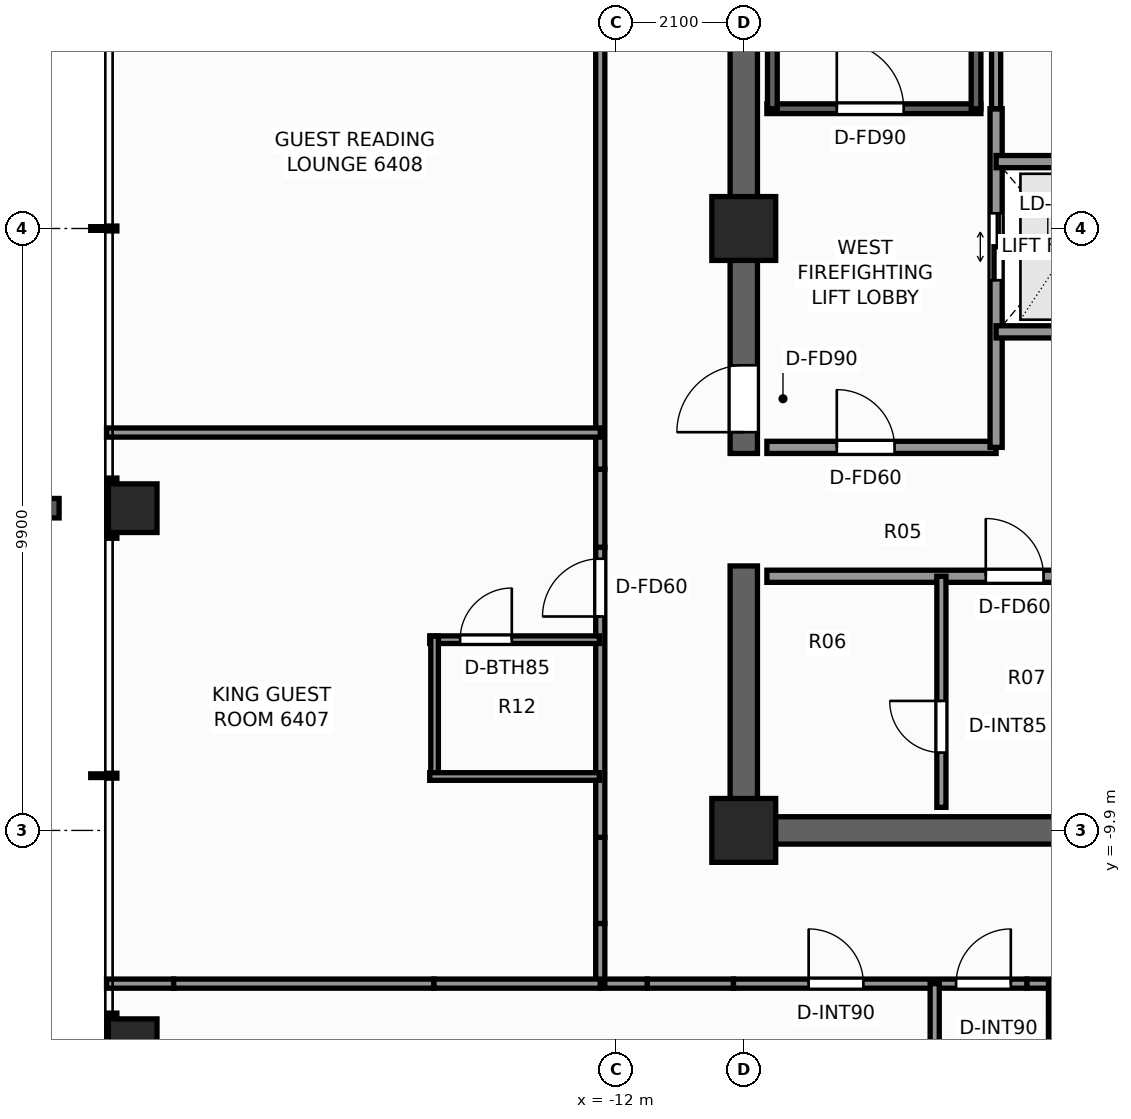
"""IFC4 building model, lengths in metres.
Left out: names, types, materials, properties, quantities, classifications, styles, units other than length and angle.
Written with IfcOpenShell. Run it as: python <this file> out.ifc"""

import sys

from ifc_helpers import new_model, si_unit, direction, frame, frame_2d, origin, origin_2d, place, context, subcontext, project, spatial, rectangle, extrude, element, fill, save


model = new_model("IFC4")
c1 = context("Model", 3, precision=1e-05, world=origin(), true_north=direction((0.0, 1.0)))
c2 = subcontext(c1, "Body", "Model", "MODEL_VIEW")
j1 = project(units=[si_unit("LENGTHUNIT", "METRE"), si_unit("PLANEANGLEUNIT", "RADIAN")], contexts=[c1])
p1 = place(None, origin())
s1 = spatial("IfcSite", under=j1, at=p1, CompositionType="ELEMENT")
p2 = place(p1, origin())
s2 = spatial("IfcBuilding", under=s1, at=p2, CompositionType="ELEMENT")
p3 = place(p2, frame((0.0, 0.0, 219.6)))
s3 = spatial("IfcBuildingStorey", under=s2, at=p3, CompositionType="ELEMENT", Elevation=219.6)
p4 = place(p3, frame((-3.54, -9.9, 0.0), z_axis=(0.0, 0.0, 1.0), x_axis=(-1.0, 0.0, 0.0)))
e1 = element("IfcWall", 1, at=p4, inside=s3, PredefinedType="SHEAR", context=c2, shape_type="SweptSolid", body=[
    extrude(rectangle(XDim=6.585, YDim=0.45, at=frame_2d((3.292, 0.0))), origin(), (0.0, 0.0, 1.0), 3.3),
])
p5 = place(p3, frame((-9.9, -9.675, 0.0), z_axis=(0.0, 0.0, 1.0), x_axis=(0.0, 1.0, 0.0)))
e2 = element("IfcWall", 2, at=p5, inside=s3, PredefinedType="SHEAR", context=c2, shape_type="SweptSolid", body=[
    extrude(rectangle(XDim=4.125, YDim=0.45, at=frame_2d((2.062, 0.0))), origin(), (0.0, 0.0, 1.0), 3.3),
])
p6 = place(p3, frame((-9.9, -3.7, 0.0), z_axis=(0.0, 0.0, 1.0), x_axis=(0.0, 1.0, 0.0)))
e3 = element("IfcWall", 3, at=p6, inside=s3, PredefinedType="SHEAR", context=c2, shape_type="SweptSolid", body=[
    extrude(rectangle(XDim=13.375, YDim=0.45, at=frame_2d((6.688, 0.0))), origin(), (0.0, 0.0, 1.0), 3.3),
])
p7 = place(p6, frame((0.35, 0.0, 0.0)))
e4 = element("IfcOpeningElement", 4, at=p7, cuts=e3, PredefinedType="OPENING", context=c2, shape_type="SweptSolid", body=[
    extrude(rectangle(XDim=1.1, YDim=2.2, at=frame_2d((0.55, 1.1))), frame((0.0, 0.235, 0.0), z_axis=(0.0, -1.0, 0.0), x_axis=(1.0, 0.0, 0.0)), (0.0, 0.0, 1.0), 0.47),
])
for number, where, z_axis, x_axis in (
    (5, (-9.9, -9.9, 0.0), (0.0, 0.0, 1.0), (1.0, 0.0, 0.0)),
    (6, (-9.9, 0.0, 0.0), (0.0, 0.0, 1.0), (1.0, 0.0, 0.0)),
):
    element("IfcColumn", number, at=place(p3, frame(where, z_axis=z_axis, x_axis=x_axis)), inside=s3, PredefinedType="COLUMN", context=c2, shape_type="SweptSolid", body=[
        extrude(rectangle(XDim=1.05, YDim=1.05, at=origin_2d()), origin(), (0.0, 0.0, 1.0), 3.3),
    ])
for number, where, z_axis, x_axis in (
    (7, (-19.95, -13.4, 0.0), (0.0, 0.0, 1.0), (1.0, 0.0, 0.0)),
    (8, (-19.95, -4.6, 0.0), (0.0, 0.0, 1.0), (1.0, 0.0, 0.0)),
):
    element("IfcColumn", number, at=place(p3, frame(where, z_axis=z_axis, x_axis=x_axis)), inside=s3, PredefinedType="COLUMN", context=c2, shape_type="SweptSolid", body=[
        extrude(rectangle(XDim=0.8, YDim=0.8, at=origin_2d()), origin(), (0.0, 0.0, 1.0), 3.3),
    ])
p8 = place(p3, frame((-9.52, 1.97, 0.0), z_axis=(0.0, 0.0, 1.0), x_axis=(1.0, 0.0, 0.0)))
e9 = element("IfcWall", 9, at=p8, inside=s3, PredefinedType="SHEAR", context=c2, shape_type="SweptSolid", body=[
    extrude(rectangle(XDim=3.52, YDim=0.16, at=frame_2d((1.76, 0.0))), origin(), (0.0, 0.0, 1.0), 3.3),
])
p9 = place(p8, frame((1.15, 0.0, 0.0)))
e10 = element("IfcOpeningElement", 10, at=p9, cuts=e9, PredefinedType="OPENING", context=c2, shape_type="SweptSolid", body=[
    extrude(rectangle(XDim=1.1, YDim=2.2, at=frame_2d((0.55, 1.1))), frame((0.0, 0.09, 0.0), z_axis=(0.0, -1.0, 0.0), x_axis=(1.0, 0.0, 0.0)), (0.0, 0.0, 1.0), 0.18),
])
for number, where, z_axis, x_axis in (
    (11, (-9.43, 1.97, 0.0), (0.0, 0.0, 1.0), (0.0, 1.0, 0.0)),
    (12, (-6.08, 1.97, 0.0), (0.0, 0.0, 1.0), (0.0, 1.0, 0.0)),
):
    element("IfcWall", number, at=place(p3, frame(where, z_axis=z_axis, x_axis=x_axis)), inside=s3, PredefinedType="SHEAR", context=c2, shape_type="SweptSolid", body=[
        extrude(rectangle(XDim=7.56, YDim=0.16, at=frame_2d((3.78, 0.0))), origin(), (0.0, 0.0, 1.0), 3.3),
    ])
p10 = place(p3, frame((-9.52, -3.6, 0.0), z_axis=(0.0, 0.0, 1.0), x_axis=(1.0, 0.0, 0.0)))
e13 = element("IfcWall", 13, at=p10, inside=s3, PredefinedType="SOLIDWALL", context=c2, shape_type="SweptSolid", body=[
    extrude(rectangle(XDim=3.77, YDim=0.2, at=frame_2d((1.885, 0.0))), origin(), (0.0, 0.0, 1.0), 3.08),
])
p11 = place(p10, frame((1.15, 0.0, 0.0)))
e14 = element("IfcOpeningElement", 14, at=p11, cuts=e13, PredefinedType="OPENING", context=c2, shape_type="SweptSolid", body=[
    extrude(rectangle(XDim=0.95, YDim=2.06, at=frame_2d((0.475, 1.03))), frame((0.0, 0.11, 0.0), z_axis=(0.0, -1.0, 0.0), x_axis=(1.0, 0.0, 0.0)), (0.0, 0.0, 1.0), 0.22),
])
p12 = place(p3, frame((-5.75, -3.6, 0.0), z_axis=(0.0, 0.0, 1.0), x_axis=(0.0, 1.0, 0.0)))
e15 = element("IfcWall", 15, at=p12, inside=s3, PredefinedType="SOLIDWALL", context=c2, shape_type="SweptSolid", body=[
    extrude(rectangle(XDim=5.57, YDim=0.2, at=frame_2d((2.785, 0.0))), origin(), (0.0, 0.0, 1.0), 3.08),
])
p13 = place(p12, frame((2.75, 0.0, 0.0)))
e16 = element("IfcOpeningElement", 16, at=p13, cuts=e15, PredefinedType="OPENING", context=c2, shape_type="SweptSolid", body=[
    extrude(rectangle(XDim=1.1, YDim=2.2, at=frame_2d((0.55, 1.1))), frame((0.0, 0.11, 0.0), z_axis=(0.0, -1.0, 0.0), x_axis=(1.0, 0.0, 0.0)), (0.0, 0.0, 1.0), 0.22),
])
for number, where, z_axis, x_axis in (
    (17, (-5.75, -1.7, 0.0), (0.0, 0.0, 1.0), (1.0, 0.0, 0.0)),
    (18, (-5.75, 1.1, 0.0), (0.0, 0.0, 1.0), (1.0, 0.0, 0.0)),
):
    element("IfcWall", number, at=place(p3, frame(where, z_axis=z_axis, x_axis=x_axis)), inside=s3, PredefinedType="SOLIDWALL", context=c2, shape_type="SweptSolid", body=[
        extrude(rectangle(XDim=2.4, YDim=0.2, at=frame_2d((1.2, 0.0))), origin(), (0.0, 0.0, 1.0), 3.08),
    ])
p14 = place(p3, frame((-9.52, -5.72, 0.0), z_axis=(0.0, 0.0, 1.0), x_axis=(1.0, 0.0, 0.0)))
e19 = element("IfcWall", 19, at=p14, inside=s3, PredefinedType="SOLIDWALL", context=c2, shape_type="SweptSolid", body=[
    extrude(rectangle(XDim=5.66, YDim=0.2, at=frame_2d((2.83, 0.0))), origin(), (0.0, 0.0, 1.0), 3.08),
])
p15 = place(p14, frame((3.6, 0.0, 0.0)))
e20 = element("IfcOpeningElement", 20, at=p15, cuts=e19, PredefinedType="OPENING", context=c2, shape_type="SweptSolid", body=[
    extrude(rectangle(XDim=0.95, YDim=2.06, at=frame_2d((0.475, 1.03))), frame((0.0, 0.11, 0.0), z_axis=(0.0, -1.0, 0.0), x_axis=(1.0, 0.0, 0.0)), (0.0, 0.0, 1.0), 0.22),
])
p16 = place(p3, frame((-6.65, -9.52, 0.0), z_axis=(0.0, 0.0, 1.0), x_axis=(0.0, 1.0, 0.0)))
e21 = element("IfcWall", 21, at=p16, inside=s3, PredefinedType="PARTITIONING", context=c2, shape_type="SweptSolid", body=[
    extrude(rectangle(XDim=3.8, YDim=0.15, at=frame_2d((1.9, 0.0))), origin(), (0.0, 0.0, 1.0), 3.08),
])
p17 = place(p16, frame((0.9, 0.0, 0.0)))
e22 = element("IfcOpeningElement", 22, at=p17, cuts=e21, PredefinedType="OPENING", context=c2, shape_type="SweptSolid", body=[
    extrude(rectangle(XDim=0.85, YDim=2.03, at=frame_2d((0.425, 1.015))), frame((0.0, 0.085, 0.0), z_axis=(0.0, -1.0, 0.0), x_axis=(1.0, 0.0, 0.0)), (0.0, 0.0, 1.0), 0.17),
])
p18 = place(p3, frame((-5.75, 1.97, 0.0), z_axis=(0.0, 0.0, 1.0), x_axis=(0.0, 1.0, 0.0)))
e23 = element("IfcWall", 23, at=p18, inside=s3, PredefinedType="PARTITIONING", context=c2, shape_type="SweptSolid", body=[
    extrude(rectangle(XDim=2.33, YDim=0.15, at=frame_2d((1.165, 0.0))), origin(), (0.0, 0.0, 1.0), 3.08),
])
p19 = place(p3, frame((-12.26, -12.42, 0.0), z_axis=(0.0, 0.0, 1.0), x_axis=(1.0, 0.0, 0.0)))
e24 = element("IfcWall", 24, at=p19, inside=s3, PredefinedType="PARTITIONING", context=c2, shape_type="SweptSolid", body=[
    extrude(rectangle(XDim=0.774, YDim=0.15, at=frame_2d((0.387, 0.0))), origin(), (0.0, 0.0, 1.0), 3.08),
])
p20 = place(p3, frame((-11.486, -12.42, 0.0), z_axis=(0.0, 0.0, 1.0), x_axis=(1.0, 0.0, 0.0)))
e25 = element("IfcWall", 25, at=p20, inside=s3, PredefinedType="PARTITIONING", context=c2, shape_type="SweptSolid", body=[
    extrude(rectangle(XDim=1.417, YDim=0.15, at=frame_2d((0.708, 0.0))), origin(), (0.0, 0.0, 1.0), 1.265),
])
p21 = place(p3, frame((-10.069, -12.42, 0.0), z_axis=(0.0, 0.0, 1.0), x_axis=(1.0, 0.0, 0.0)))
e26 = element("IfcWall", 26, at=p21, inside=s3, PredefinedType="PARTITIONING", context=c2, shape_type="SweptSolid", body=[
    extrude(rectangle(XDim=4.827, YDim=0.15, at=frame_2d((2.414, 0.0))), origin(), (0.0, 0.0, 1.0), 3.08),
])
p22 = place(p21, frame((1.236, 0.0, 0.0)))
e27 = element("IfcOpeningElement", 27, at=p22, cuts=e26, PredefinedType="OPENING", context=c2, shape_type="SweptSolid", body=[
    extrude(rectangle(XDim=0.9, YDim=2.06, at=frame_2d((0.45, 1.03))), frame((0.0, 0.085, 0.0), z_axis=(0.0, -1.0, 0.0), x_axis=(1.0, 0.0, 0.0)), (0.0, 0.0, 1.0), 0.17),
])
p23 = place(p21, frame((3.661, 0.0, 0.0)))
e28 = element("IfcOpeningElement", 28, at=p23, cuts=e26, PredefinedType="OPENING", context=c2, shape_type="SweptSolid", body=[
    extrude(rectangle(XDim=0.9, YDim=2.06, at=frame_2d((0.45, 1.03))), frame((0.0, 0.085, 0.0), z_axis=(0.0, -1.0, 0.0), x_axis=(1.0, 0.0, 0.0)), (0.0, 0.0, 1.0), 0.17),
])
p24 = place(p3, frame((-5.242, -12.42, 0.0), z_axis=(0.0, 0.0, 1.0), x_axis=(1.0, 0.0, 0.0)))
e29 = element("IfcWall", 29, at=p24, inside=s3, PredefinedType="PARTITIONING", context=c2, shape_type="SweptSolid", body=[
    extrude(rectangle(XDim=1.284, YDim=0.15, at=frame_2d((0.642, 0.0))), origin(), (0.0, 0.0, 1.0), 1.265),
])
p25 = place(p3, frame((-12.26, -12.42, 0.0), z_axis=(0.0, 0.0, 1.0), x_axis=(0.0, 1.0, 0.0)))
e30 = element("IfcWall", 30, at=p25, inside=s3, PredefinedType="PARTITIONING", context=c2, shape_type="SweptSolid", body=[
    extrude(rectangle(XDim=0.99, YDim=0.15, at=frame_2d((0.495, 0.0))), origin(), (0.0, 0.0, 1.0), 3.08),
])
p26 = place(p3, frame((-12.26, -11.43, 0.0), z_axis=(0.0, 0.0, 1.0), x_axis=(0.0, 1.0, 0.0)))
e31 = element("IfcWall", 31, at=p26, inside=s3, PredefinedType="PARTITIONING", context=c2, shape_type="SweptSolid", body=[
    extrude(rectangle(XDim=1.417, YDim=0.15, at=frame_2d((0.708, 0.0))), origin(), (0.0, 0.0, 1.0), 1.265),
])
p27 = place(p3, frame((-12.26, -10.014, 0.0), z_axis=(0.0, 0.0, 1.0), x_axis=(0.0, 1.0, 0.0)))
e32 = element("IfcWall", 32, at=p27, inside=s3, PredefinedType="PARTITIONING", context=c2, shape_type="SweptSolid", body=[
    extrude(rectangle(XDim=4.772, YDim=0.15, at=frame_2d((2.386, 0.0))), origin(), (0.0, 0.0, 1.0), 3.08),
])
p28 = place(p27, frame((3.632, 0.0, 0.0)))
e33 = element("IfcOpeningElement", 33, at=p28, cuts=e32, PredefinedType="OPENING", context=c2, shape_type="SweptSolid", body=[
    extrude(rectangle(XDim=0.95, YDim=2.06, at=frame_2d((0.475, 1.03))), frame((0.0, 0.085, 0.0), z_axis=(0.0, -1.0, 0.0), x_axis=(1.0, 0.0, 0.0)), (0.0, 0.0, 1.0), 0.17),
])
p29 = place(p3, frame((-12.26, -5.242, 0.0), z_axis=(0.0, 0.0, 1.0), x_axis=(0.0, 1.0, 0.0)))
e34 = element("IfcWall", 34, at=p29, inside=s3, PredefinedType="PARTITIONING", context=c2, shape_type="SweptSolid", body=[
    extrude(rectangle(XDim=1.284, YDim=0.15, at=frame_2d((0.642, 0.0))), origin(), (0.0, 0.0, 1.0), 1.265),
])
p30 = place(p3, frame((-12.26, -3.958, 0.0), z_axis=(0.0, 0.0, 1.0), x_axis=(0.0, 1.0, 0.0)))
e35 = element("IfcWall", 35, at=p30, inside=s3, PredefinedType="PARTITIONING", context=c2, shape_type="SweptSolid", body=[
    extrude(rectangle(XDim=7.916, YDim=0.15, at=frame_2d((3.958, 0.0))), origin(), (0.0, 0.0, 1.0), 2.369),
])
p31 = place(p3, frame((-20.38, -12.42, 0.0), z_axis=(0.0, 0.0, 1.0), x_axis=(1.0, 0.0, 0.0)))
e36 = element("IfcWall", 36, at=p31, inside=s3, PredefinedType="PARTITIONING", context=c2, shape_type="SweptSolid", body=[
    extrude(rectangle(XDim=1.103, YDim=0.15, at=frame_2d((0.552, 0.0))), origin(), (0.0, 0.0, 1.0), 2.453),
])
p32 = place(p3, frame((-19.277, -12.42, 0.0), z_axis=(0.0, 0.0, 1.0), x_axis=(1.0, 0.0, 0.0)))
e37 = element("IfcWall", 37, at=p32, inside=s3, PredefinedType="PARTITIONING", context=c2, shape_type="SweptSolid", body=[
    extrude(rectangle(XDim=4.281, YDim=0.15, at=frame_2d((2.141, 0.0))), origin(), (0.0, 0.0, 1.0), 1.265),
])
p33 = place(p3, frame((-14.995, -12.42, 0.0), z_axis=(0.0, 0.0, 1.0), x_axis=(1.0, 0.0, 0.0)))
e38 = element("IfcWall", 38, at=p33, inside=s3, PredefinedType="PARTITIONING", context=c2, shape_type="SweptSolid", body=[
    extrude(rectangle(XDim=2.735, YDim=0.15, at=frame_2d((1.368, 0.0))), origin(), (0.0, 0.0, 1.0), 3.08),
])
p34 = place(p3, frame((-6.76, -20.38, 0.0), z_axis=(0.0, 0.0, 1.0), x_axis=(0.0, 1.0, 0.0)))
e39 = element("IfcWall", 39, at=p34, inside=s3, PredefinedType="PARTITIONING", context=c2, shape_type="SweptSolid", body=[
    extrude(rectangle(XDim=7.96, YDim=0.15, at=frame_2d((3.98, 0.0))), origin(), (0.0, 0.0, 1.0), 2.453),
])
p35 = place(p3, frame((-4.827, -19.8, 0.0), z_axis=(0.0, 0.0, 1.0), x_axis=(0.0, 1.0, 0.0)))
e40 = element("IfcWall", 40, at=p35, inside=s3, PredefinedType="PARTITIONING", context=c2, shape_type="SweptSolid", body=[
    extrude(rectangle(XDim=7.405, YDim=0.125, at=frame_2d((3.703, 0.0))), origin(), (0.0, 0.0, 1.0), 1.265),
])
p36 = place(p3, frame((-20.38, -3.356, 0.0), z_axis=(0.0, 0.0, 1.0), x_axis=(1.0, 0.0, 0.0)))
e41 = element("IfcWall", 41, at=p36, inside=s3, PredefinedType="PARTITIONING", context=c2, shape_type="SweptSolid", body=[
    extrude(rectangle(XDim=8.12, YDim=0.15, at=frame_2d((4.06, 0.0))), origin(), (0.0, 0.0, 1.0), 2.369),
])
p37 = place(p3, frame((-15.065, -6.763, 0.0), z_axis=(0.0, 0.0, 1.0), x_axis=(1.0, 0.0, 0.0)))
e42 = element("IfcWall", 42, at=p37, inside=s3, PredefinedType="PARTITIONING", context=c2, shape_type="SweptSolid", body=[
    extrude(rectangle(XDim=2.79, YDim=0.125, at=frame_2d((1.395, 0.0))), origin(), (0.0, 0.0, 1.0), 3.08),
])
p38 = place(p37, frame((0.5, 0.0, 0.0)))
e43 = element("IfcOpeningElement", 43, at=p38, cuts=e42, PredefinedType="OPENING", context=c2, shape_type="SweptSolid", body=[
    extrude(rectangle(XDim=0.85, YDim=2.03, at=frame_2d((0.425, 1.015))), frame((0.0, 0.073, 0.0), z_axis=(0.0, -1.0, 0.0), x_axis=(1.0, 0.0, 0.0)), (0.0, 0.0, 1.0), 0.145),
])
p39 = place(p3, frame((-14.985, -9.073, 0.0), z_axis=(0.0, 0.0, 1.0), x_axis=(0.0, 1.0, 0.0)))
e44 = element("IfcWall", 44, at=p39, inside=s3, PredefinedType="PARTITIONING", context=c2, shape_type="SweptSolid", body=[
    extrude(rectangle(XDim=2.37, YDim=0.125, at=frame_2d((1.185, 0.0))), origin(), (0.0, 0.0, 1.0), 3.08),
])
p40 = place(p3, frame((-15.065, -9.013, 0.0), z_axis=(0.0, 0.0, 1.0), x_axis=(1.0, 0.0, 0.0)))
e45 = element("IfcWall", 45, at=p40, inside=s3, PredefinedType="PARTITIONING", context=c2, shape_type="SweptSolid", body=[
    extrude(rectangle(XDim=2.79, YDim=0.125, at=frame_2d((1.395, 0.0))), origin(), (0.0, 0.0, 1.0), 3.08),
])
p41 = place(p9, origin())
e46 = element("IfcDoor", 46, at=p41, inside=s3, OperationType="SINGLE_SWING_LEFT", PredefinedType="DOOR", context=c2, shape_type="SweptSolid", body=[
    extrude(rectangle(XDim=1.1, YDim=2.2, at=frame_2d((0.55, 1.1))), frame((0.0, 0.025, 0.0), z_axis=(0.0, -1.0, 0.0), x_axis=(1.0, 0.0, 0.0)), (0.0, 0.0, 1.0), 0.05),
])
fill(e10, e46)
p42 = place(p7, origin())
e47 = element("IfcDoor", 47, at=p42, inside=s3, OperationType="SINGLE_SWING_LEFT", PredefinedType="DOOR", context=c2, shape_type="SweptSolid", body=[
    extrude(rectangle(XDim=1.1, YDim=2.2, at=frame_2d((0.55, 1.1))), frame((0.0, 0.025, 0.0), z_axis=(0.0, -1.0, 0.0), x_axis=(1.0, 0.0, 0.0)), (0.0, 0.0, 1.0), 0.05),
])
fill(e4, e47)
p43 = place(p13, origin())
e48 = element("IfcDoor", 48, at=p43, inside=s3, OperationType="DOUBLE_DOOR_SLIDING", PredefinedType="DOOR", context=c2, shape_type="SweptSolid", body=[
    extrude(rectangle(XDim=1.1, YDim=2.2, at=frame_2d((0.55, 1.1))), frame((0.0, 0.025, 0.0), z_axis=(0.0, -1.0, 0.0), x_axis=(1.0, 0.0, 0.0)), (0.0, 0.0, 1.0), 0.05),
])
fill(e16, e48)
p44 = place(p15, origin())
e49 = element("IfcDoor", 49, at=p44, inside=s3, OperationType="SINGLE_SWING_LEFT", PredefinedType="DOOR", context=c2, shape_type="SweptSolid", body=[
    extrude(rectangle(XDim=0.95, YDim=2.06, at=frame_2d((0.475, 1.03))), frame((0.0, 0.025, 0.0), z_axis=(0.0, -1.0, 0.0), x_axis=(1.0, 0.0, 0.0)), (0.0, 0.0, 1.0), 0.05),
])
fill(e20, e49)
p45 = place(p17, origin())
e50 = element("IfcDoor", 50, at=p45, inside=s3, OperationType="SINGLE_SWING_RIGHT", PredefinedType="DOOR", context=c2, shape_type="SweptSolid", body=[
    extrude(rectangle(XDim=0.85, YDim=2.03, at=frame_2d((0.425, 1.015))), frame((0.0, 0.025, 0.0), z_axis=(0.0, -1.0, 0.0), x_axis=(1.0, 0.0, 0.0)), (0.0, 0.0, 1.0), 0.05),
])
fill(e22, e50)
p46 = place(p11, origin())
e51 = element("IfcDoor", 51, at=p46, inside=s3, OperationType="SINGLE_SWING_LEFT", PredefinedType="DOOR", context=c2, shape_type="SweptSolid", body=[
    extrude(rectangle(XDim=0.95, YDim=2.06, at=frame_2d((0.475, 1.03))), frame((0.0, 0.025, 0.0), z_axis=(0.0, -1.0, 0.0), x_axis=(1.0, 0.0, 0.0)), (0.0, 0.0, 1.0), 0.05),
])
fill(e14, e51)
p47 = place(p22, origin())
e52 = element("IfcDoor", 52, at=p47, inside=s3, OperationType="SINGLE_SWING_LEFT", PredefinedType="DOOR", context=c2, shape_type="SweptSolid", body=[
    extrude(rectangle(XDim=0.9, YDim=2.06, at=frame_2d((0.45, 1.03))), frame((0.0, 0.025, 0.0), z_axis=(0.0, -1.0, 0.0), x_axis=(1.0, 0.0, 0.0)), (0.0, 0.0, 1.0), 0.05),
])
fill(e27, e52)
p48 = place(p23, origin())
e53 = element("IfcDoor", 53, at=p48, inside=s3, OperationType="SINGLE_SWING_RIGHT", PredefinedType="DOOR", context=c2, shape_type="SweptSolid", body=[
    extrude(rectangle(XDim=0.9, YDim=2.06, at=frame_2d((0.45, 1.03))), frame((0.0, 0.025, 0.0), z_axis=(0.0, -1.0, 0.0), x_axis=(1.0, 0.0, 0.0)), (0.0, 0.0, 1.0), 0.05),
])
fill(e28, e53)
p49 = place(p38, origin())
e54 = element("IfcDoor", 54, at=p49, inside=s3, OperationType="SINGLE_SWING_RIGHT", PredefinedType="DOOR", context=c2, shape_type="SweptSolid", body=[
    extrude(rectangle(XDim=0.85, YDim=2.03, at=frame_2d((0.425, 1.015))), frame((0.0, 0.025, 0.0), z_axis=(0.0, -1.0, 0.0), x_axis=(1.0, 0.0, 0.0)), (0.0, 0.0, 1.0), 0.05),
])
fill(e43, e54)
p50 = place(p28, origin())
e55 = element("IfcDoor", 55, at=p50, inside=s3, OperationType="SINGLE_SWING_LEFT", PredefinedType="DOOR", context=c2, shape_type="SweptSolid", body=[
    extrude(rectangle(XDim=0.95, YDim=2.06, at=frame_2d((0.475, 1.03))), frame((0.0, 0.025, 0.0), z_axis=(0.0, -1.0, 0.0), x_axis=(1.0, 0.0, 0.0)), (0.0, 0.0, 1.0), 0.05),
])
fill(e33, e55)
save(model, sys.argv[1])
